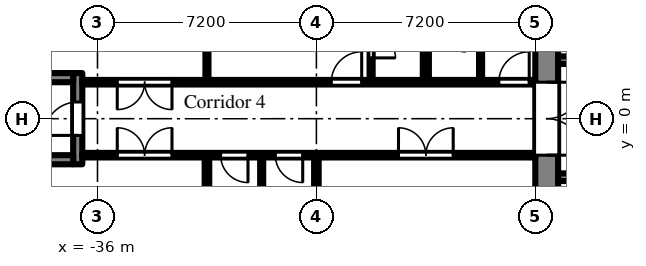
"""IFC4 building model, lengths in metres.
Left out: names, types, materials, properties, quantities, classifications, styles, units other than length and angle.
Written with IfcOpenShell. Run it as: python <this file> out.ifc"""

import sys

from ifc_helpers import new_model, si_unit, direction, frame, frame_2d, origin, place, context, subcontext, project, spatial, rectangle, extrude, element, fill, save


model = new_model("IFC4")
c1 = context("Model", 3, precision=1e-05, world=origin(), true_north=direction((0.0, 1.0)))
c2 = subcontext(c1, "Body", "Model", "MODEL_VIEW")
j1 = project(units=[si_unit("LENGTHUNIT", "METRE"), si_unit("PLANEANGLEUNIT", "RADIAN")], contexts=[c1])
p1 = place(None, origin())
s1 = spatial("IfcSite", under=j1, at=p1, CompositionType="ELEMENT")
p2 = place(p1, origin())
s2 = spatial("IfcBuilding", under=s1, at=p2, CompositionType="ELEMENT")
p3 = place(p2, frame((0.0, 0.0, 53.7)))
s3 = spatial("IfcBuildingStorey", under=s2, at=p3, CompositionType="ELEMENT", Elevation=53.7)
p4 = place(p3, frame((-21.225, -7.2, 0.0), z_axis=(0.0, 0.0, 1.0), x_axis=(0.0, 1.0, 0.0)))
e1 = element("IfcWall", 1, at=p4, inside=s3, PredefinedType="SHEAR", context=c2, shape_type="SweptSolid", body=[
    extrude(rectangle(XDim=14.4, YDim=0.75, at=frame_2d((7.2, 0.0))), origin(), (0.0, 0.0, 1.0), 2.575),
])
p5 = place(p4, frame((6.0, 0.0, 0.0)))
e2 = element("IfcOpeningElement", 2, at=p5, cuts=e1, PredefinedType="OPENING", context=c2, shape_type="SweptSolid", body=[
    extrude(rectangle(XDim=2.4, YDim=2.2, at=frame_2d((1.2, 1.1))), frame((0.0, 0.385, 0.0), z_axis=(0.0, -1.0, 0.0), x_axis=(1.0, 0.0, 0.0)), (0.0, 0.0, 1.0), 0.77),
])
p6 = place(p3, frame((-7.9, 1.925, 0.0), z_axis=(0.0, 0.0, 1.0), x_axis=(-1.0, 0.0, 0.0)))
e3 = element("IfcWall", 3, at=p6, inside=s3, PredefinedType="SHEAR", context=c2, shape_type="SweptSolid", body=[
    extrude(rectangle(XDim=12.95, YDim=0.25, at=frame_2d((6.475, 0.0))), origin(), (0.0, 0.0, 1.0), 2.575),
])
p7 = place(p6, frame((0.525, 0.0, 0.0)))
e4 = element("IfcOpeningElement", 4, at=p7, cuts=e3, PredefinedType="OPENING", context=c2, shape_type="SweptSolid", body=[
    extrude(rectangle(XDim=0.9, YDim=2.1, at=frame_2d((0.45, 1.05))), frame((0.0, 0.135, 0.0), z_axis=(0.0, -1.0, 0.0), x_axis=(1.0, 0.0, 0.0)), (0.0, 0.0, 1.0), 0.27),
])
p8 = place(p6, frame((2.625, 0.0, 0.0)))
e5 = element("IfcOpeningElement", 5, at=p8, cuts=e3, PredefinedType="OPENING", context=c2, shape_type="SweptSolid", body=[
    extrude(rectangle(XDim=1.1, YDim=2.1, at=frame_2d((0.55, 1.05))), frame((0.0, 0.135, 0.0), z_axis=(0.0, -1.0, 0.0), x_axis=(1.0, 0.0, 0.0)), (0.0, 0.0, 1.0), 0.27),
])
p9 = place(p6, frame((6.025, 0.0, 0.0)))
e6 = element("IfcOpeningElement", 6, at=p9, cuts=e3, PredefinedType="OPENING", context=c2, shape_type="SweptSolid", body=[
    extrude(rectangle(XDim=0.9, YDim=2.1, at=frame_2d((0.45, 1.05))), frame((0.0, 0.135, 0.0), z_axis=(0.0, -1.0, 0.0), x_axis=(1.0, 0.0, 0.0)), (0.0, 0.0, 1.0), 0.27),
])
p10 = place(p6, frame((9.325, 0.0, 0.0)))
e7 = element("IfcOpeningElement", 7, at=p10, cuts=e3, PredefinedType="OPENING", context=c2, shape_type="SweptSolid", body=[
    extrude(rectangle(XDim=0.9, YDim=2.1, at=frame_2d((0.45, 1.05))), frame((0.0, 0.135, 0.0), z_axis=(0.0, -1.0, 0.0), x_axis=(1.0, 0.0, 0.0)), (0.0, 0.0, 1.0), 0.27),
])
p11 = place(p3, frame((-7.9, -1.925, 0.0), z_axis=(0.0, 0.0, 1.0), x_axis=(-1.0, 0.0, 0.0)))
e8 = element("IfcWall", 8, at=p11, inside=s3, PredefinedType="SHEAR", context=c2, shape_type="SweptSolid", body=[
    extrude(rectangle(XDim=12.95, YDim=0.25, at=frame_2d((6.475, 0.0))), origin(), (0.0, 0.0, 1.0), 2.575),
])
p12 = place(p11, frame((4.825, 0.0, 0.0)))
e9 = element("IfcOpeningElement", 9, at=p12, cuts=e8, PredefinedType="OPENING", context=c2, shape_type="SweptSolid", body=[
    extrude(rectangle(XDim=1.1, YDim=2.1, at=frame_2d((0.55, 1.05))), frame((0.0, 0.135, 0.0), z_axis=(0.0, -1.0, 0.0), x_axis=(1.0, 0.0, 0.0)), (0.0, 0.0, 1.0), 0.27),
])
p13 = place(p11, frame((7.025, 0.0, 0.0)))
e10 = element("IfcOpeningElement", 10, at=p13, cuts=e8, PredefinedType="OPENING", context=c2, shape_type="SweptSolid", body=[
    extrude(rectangle(XDim=1.1, YDim=2.1, at=frame_2d((0.55, 1.05))), frame((0.0, 0.135, 0.0), z_axis=(0.0, -1.0, 0.0), x_axis=(1.0, 0.0, 0.0)), (0.0, 0.0, 1.0), 0.27),
])
p14 = place(p11, frame((9.225, 0.0, 0.0)))
e11 = element("IfcOpeningElement", 11, at=p14, cuts=e8, PredefinedType="OPENING", context=c2, shape_type="SweptSolid", body=[
    extrude(rectangle(XDim=1.1, YDim=2.1, at=frame_2d((0.55, 1.05))), frame((0.0, 0.135, 0.0), z_axis=(0.0, -1.0, 0.0), x_axis=(1.0, 0.0, 0.0)), (0.0, 0.0, 1.0), 0.27),
])
p15 = place(p11, frame((0.525, 0.0, 0.0)))
e12 = element("IfcOpeningElement", 12, at=p15, cuts=e8, PredefinedType="OPENING", context=c2, shape_type="SweptSolid", body=[
    extrude(rectangle(XDim=0.9, YDim=2.1, at=frame_2d((0.45, 1.05))), frame((0.0, 0.135, 0.0), z_axis=(0.0, -1.0, 0.0), x_axis=(1.0, 0.0, 0.0)), (0.0, 0.0, 1.0), 0.27),
])
p16 = place(p11, frame((2.625, 0.0, 0.0)))
e13 = element("IfcOpeningElement", 13, at=p16, cuts=e8, PredefinedType="OPENING", context=c2, shape_type="SweptSolid", body=[
    extrude(rectangle(XDim=1.1, YDim=2.1, at=frame_2d((0.55, 1.05))), frame((0.0, 0.135, 0.0), z_axis=(0.0, -1.0, 0.0), x_axis=(1.0, 0.0, 0.0)), (0.0, 0.0, 1.0), 0.27),
])
p17 = place(p3, frame((-36.65, -1.5, 0.0), z_axis=(0.0, 0.0, 1.0), x_axis=(0.0, 1.0, 0.0)))
e14 = element("IfcWall", 14, at=p17, inside=s3, PredefinedType="SHEAR", context=c2, shape_type="SweptSolid", body=[
    extrude(rectangle(XDim=3.0, YDim=0.3, at=frame_2d((1.5, 0.0))), origin(), (0.0, 0.0, 1.0), 2.575),
])
p18 = place(p17, frame((0.95, 0.0, 0.0)))
e15 = element("IfcOpeningElement", 15, at=p18, cuts=e14, PredefinedType="OPENING", context=c2, shape_type="SweptSolid", body=[
    extrude(rectangle(XDim=1.1, YDim=2.1, at=frame_2d((0.55, 1.05))), frame((0.0, 0.16, 0.0), z_axis=(0.0, -1.0, 0.0), x_axis=(1.0, 0.0, 0.0)), (0.0, 0.0, 1.0), 0.32),
])
for number, where, z_axis, x_axis in (
    (16, (-36.8, -1.35, 0.0), (0.0, 0.0, 1.0), (-1.0, 0.0, 0.0)),
    (17, (-36.8, 1.35, 0.0), (0.0, 0.0, 1.0), (-1.0, 0.0, 0.0)),
):
    element("IfcWall", number, at=place(p3, frame(where, z_axis=z_axis, x_axis=x_axis)), inside=s3, PredefinedType="SHEAR", context=c2, shape_type="SweptSolid", body=[
        extrude(rectangle(XDim=5.8, YDim=0.3, at=frame_2d((2.9, 0.0))), origin(), (0.0, 0.0, 1.0), 2.575),
    ])
p19 = place(p3, frame((-36.5, -1.2, 0.0), z_axis=(0.0, 0.0, 1.0), x_axis=(1.0, 0.0, 0.0)))
e18 = element("IfcWall", 18, at=p19, inside=s3, PredefinedType="PARTITIONING", context=c2, shape_type="SweptSolid", body=[
    extrude(rectangle(XDim=14.9, YDim=0.15, at=frame_2d((7.45, 0.0))), origin(), (0.0, 0.0, 1.0), 2.575),
])
p20 = place(p19, frame((10.4, 0.0, 0.0)))
e19 = element("IfcOpeningElement", 19, at=p20, cuts=e18, PredefinedType="OPENING", context=c2, shape_type="SweptSolid", body=[
    extrude(rectangle(XDim=1.8, YDim=2.1, at=frame_2d((0.9, 1.05))), frame((0.0, 0.085, 0.0), z_axis=(0.0, -1.0, 0.0), x_axis=(1.0, 0.0, 0.0)), (0.0, 0.0, 1.0), 0.17),
])
p21 = place(p19, frame((6.35, 0.0, 0.0)))
e20 = element("IfcOpeningElement", 20, at=p21, cuts=e18, PredefinedType="OPENING", context=c2, shape_type="SweptSolid", body=[
    extrude(rectangle(XDim=0.9, YDim=2.1, at=frame_2d((0.45, 1.05))), frame((0.0, 0.085, 0.0), z_axis=(0.0, -1.0, 0.0), x_axis=(1.0, 0.0, 0.0)), (0.0, 0.0, 1.0), 0.17),
])
p22 = place(p19, frame((4.55, 0.0, 0.0)))
e21 = element("IfcOpeningElement", 21, at=p22, cuts=e18, PredefinedType="OPENING", context=c2, shape_type="SweptSolid", body=[
    extrude(rectangle(XDim=0.9, YDim=2.1, at=frame_2d((0.45, 1.05))), frame((0.0, 0.085, 0.0), z_axis=(0.0, -1.0, 0.0), x_axis=(1.0, 0.0, 0.0)), (0.0, 0.0, 1.0), 0.17),
])
p23 = place(p19, frame((1.15, 0.0, 0.0)))
e22 = element("IfcOpeningElement", 22, at=p23, cuts=e18, PredefinedType="OPENING", context=c2, shape_type="SweptSolid", body=[
    extrude(rectangle(XDim=1.8, YDim=2.1, at=frame_2d((0.9, 1.05))), frame((0.0, 0.085, 0.0), z_axis=(0.0, -1.0, 0.0), x_axis=(1.0, 0.0, 0.0)), (0.0, 0.0, 1.0), 0.17),
])
p24 = place(p3, frame((-36.5, 1.2, 0.0), z_axis=(0.0, 0.0, 1.0), x_axis=(1.0, 0.0, 0.0)))
e23 = element("IfcWall", 23, at=p24, inside=s3, PredefinedType="PARTITIONING", context=c2, shape_type="SweptSolid", body=[
    extrude(rectangle(XDim=14.9, YDim=0.15, at=frame_2d((7.45, 0.0))), origin(), (0.0, 0.0, 1.0), 2.575),
])
p25 = place(p24, frame((13.7, 0.0, 0.0)))
e24 = element("IfcOpeningElement", 24, at=p25, cuts=e23, PredefinedType="OPENING", context=c2, shape_type="SweptSolid", body=[
    extrude(rectangle(XDim=1.0, YDim=2.1, at=frame_2d((0.5, 1.05))), frame((0.0, 0.085, 0.0), z_axis=(0.0, -1.0, 0.0), x_axis=(1.0, 0.0, 0.0)), (0.0, 0.0, 1.0), 0.17),
])
p26 = place(p24, frame((8.19, 0.0, 0.0)))
e25 = element("IfcOpeningElement", 25, at=p26, cuts=e23, PredefinedType="OPENING", context=c2, shape_type="SweptSolid", body=[
    extrude(rectangle(XDim=1.0, YDim=2.1, at=frame_2d((0.5, 1.05))), frame((0.0, 0.085, 0.0), z_axis=(0.0, -1.0, 0.0), x_axis=(1.0, 0.0, 0.0)), (0.0, 0.0, 1.0), 0.17),
])
p27 = place(p24, frame((1.15, 0.0, 0.0)))
e26 = element("IfcOpeningElement", 26, at=p27, cuts=e23, PredefinedType="OPENING", context=c2, shape_type="SweptSolid", body=[
    extrude(rectangle(XDim=1.8, YDim=2.1, at=frame_2d((0.9, 1.05))), frame((0.0, 0.085, 0.0), z_axis=(0.0, -1.0, 0.0), x_axis=(1.0, 0.0, 0.0)), (0.0, 0.0, 1.0), 0.17),
])
p28 = place(p3, frame((-32.4, -6.9, 0.0), z_axis=(0.0, 0.0, 1.0), x_axis=(0.0, 1.0, 0.0)))
e27 = element("IfcWall", 27, at=p28, inside=s3, PredefinedType="PARTITIONING", context=c2, shape_type="SweptSolid", body=[
    extrude(rectangle(XDim=5.625, YDim=0.15, at=frame_2d((2.812, 0.0))), origin(), (0.0, 0.0, 1.0), 2.575),
])
for number, where, z_axis, x_axis in (
    (28, (-32.4, 1.275, 0.0), (0.0, 0.0, 1.0), (0.0, 1.0, 0.0)),
    (29, (-30.6, -6.9, 0.0), (0.0, 0.0, 1.0), (0.0, 1.0, 0.0)),
):
    element("IfcWall", number, at=place(p3, frame(where, z_axis=z_axis, x_axis=x_axis)), inside=s3, PredefinedType="PARTITIONING", context=c2, shape_type="SweptSolid", body=[
        extrude(rectangle(XDim=5.625, YDim=0.1, at=frame_2d((2.812, 0.0))), origin(), (0.0, 0.0, 1.0), 2.575),
    ])
p29 = place(p3, frame((-28.8, -6.9, 0.0), z_axis=(0.0, 0.0, 1.0), x_axis=(0.0, 1.0, 0.0)))
e30 = element("IfcWall", 30, at=p29, inside=s3, PredefinedType="PARTITIONING", context=c2, shape_type="SweptSolid", body=[
    extrude(rectangle(XDim=5.625, YDim=0.15, at=frame_2d((2.812, 0.0))), origin(), (0.0, 0.0, 1.0), 2.575),
])
p30 = place(p3, frame((-27.0, 1.275, 0.0), z_axis=(0.0, 0.0, 1.0), x_axis=(0.0, 1.0, 0.0)))
e31 = element("IfcWall", 31, at=p30, inside=s3, PredefinedType="PARTITIONING", context=c2, shape_type="SweptSolid", body=[
    extrude(rectangle(XDim=2.375, YDim=0.1, at=frame_2d((1.188, 0.0))), origin(), (0.0, 0.0, 1.0), 2.575),
])
p31 = place(p30, frame((0.725, 0.0, 0.0)))
e32 = element("IfcOpeningElement", 32, at=p31, cuts=e31, PredefinedType="OPENING", context=c2, shape_type="SweptSolid", body=[
    extrude(rectangle(XDim=0.8, YDim=2.1, at=frame_2d((0.4, 1.05))), frame((0.0, 0.06, 0.0), z_axis=(0.0, -1.0, 0.0), x_axis=(1.0, 0.0, 0.0)), (0.0, 0.0, 1.0), 0.12),
])
p32 = place(p3, frame((-25.2, 1.275, 0.0), z_axis=(0.0, 0.0, 1.0), x_axis=(0.0, 1.0, 0.0)))
e33 = element("IfcWall", 33, at=p32, inside=s3, PredefinedType="PARTITIONING", context=c2, shape_type="SweptSolid", body=[
    extrude(rectangle(XDim=5.625, YDim=0.2, at=frame_2d((2.812, 0.0))), origin(), (0.0, 0.0, 1.0), 2.575),
])
p33 = place(p3, frame((-23.4, 1.275, 0.0), z_axis=(0.0, 0.0, 1.0), x_axis=(0.0, 1.0, 0.0)))
e34 = element("IfcWall", 34, at=p33, inside=s3, PredefinedType="PARTITIONING", context=c2, shape_type="SweptSolid", body=[
    extrude(rectangle(XDim=1.675, YDim=0.1, at=frame_2d((0.837, 0.0))), origin(), (0.0, 0.0, 1.0), 2.575),
])
p34 = place(p5, frame((2.4, 0.0, 0.0), z_axis=(0.0, 0.0, 1.0), x_axis=(-1.0, 0.0, 0.0)))
e35 = element("IfcDoor", 35, at=p34, inside=s3, OperationType="DOUBLE_DOOR_DOUBLE_SWING", PredefinedType="DOOR", context=c2, shape_type="SweptSolid", body=[
    extrude(rectangle(XDim=2.4, YDim=2.2, at=frame_2d((1.2, 1.1))), frame((0.0, 0.025, 0.0), z_axis=(0.0, -1.0, 0.0), x_axis=(1.0, 0.0, 0.0)), (0.0, 0.0, 1.0), 0.05),
])
fill(e2, e35)
p35 = place(p18, origin())
e36 = element("IfcDoor", 36, at=p35, inside=s3, OperationType="SINGLE_SWING_LEFT", PredefinedType="DOOR", context=c2, shape_type="SweptSolid", body=[
    extrude(rectangle(XDim=1.1, YDim=2.1, at=frame_2d((0.55, 1.05))), frame((0.0, 0.025, 0.0), z_axis=(0.0, -1.0, 0.0), x_axis=(1.0, 0.0, 0.0)), (0.0, 0.0, 1.0), 0.05),
])
fill(e15, e36)
p36 = place(p20, origin())
e37 = element("IfcDoor", 37, at=p36, inside=s3, OperationType="DOUBLE_DOOR_DOUBLE_SWING", PredefinedType="DOOR", context=c2, shape_type="SweptSolid", body=[
    extrude(rectangle(XDim=1.8, YDim=2.1, at=frame_2d((0.9, 1.05))), frame((0.0, 0.025, 0.0), z_axis=(0.0, -1.0, 0.0), x_axis=(1.0, 0.0, 0.0)), (0.0, 0.0, 1.0), 0.05),
])
fill(e19, e37)
p37 = place(p21, frame((0.9, 0.0, 0.0), z_axis=(0.0, 0.0, 1.0), x_axis=(-1.0, 0.0, 0.0)))
e38 = element("IfcDoor", 38, at=p37, inside=s3, OperationType="SINGLE_SWING_LEFT", PredefinedType="DOOR", context=c2, shape_type="SweptSolid", body=[
    extrude(rectangle(XDim=0.9, YDim=2.1, at=frame_2d((0.45, 1.05))), frame((0.0, 0.025, 0.0), z_axis=(0.0, -1.0, 0.0), x_axis=(1.0, 0.0, 0.0)), (0.0, 0.0, 1.0), 0.05),
])
fill(e20, e38)
p38 = place(p22, frame((0.9, 0.0, 0.0), z_axis=(0.0, 0.0, 1.0), x_axis=(-1.0, 0.0, 0.0)))
e39 = element("IfcDoor", 39, at=p38, inside=s3, OperationType="SINGLE_SWING_LEFT", PredefinedType="DOOR", context=c2, shape_type="SweptSolid", body=[
    extrude(rectangle(XDim=0.9, YDim=2.1, at=frame_2d((0.45, 1.05))), frame((0.0, 0.025, 0.0), z_axis=(0.0, -1.0, 0.0), x_axis=(1.0, 0.0, 0.0)), (0.0, 0.0, 1.0), 0.05),
])
fill(e21, e39)
p39 = place(p23, origin())
e40 = element("IfcDoor", 40, at=p39, inside=s3, OperationType="DOUBLE_DOOR_DOUBLE_SWING", PredefinedType="DOOR", context=c2, shape_type="SweptSolid", body=[
    extrude(rectangle(XDim=1.8, YDim=2.1, at=frame_2d((0.9, 1.05))), frame((0.0, 0.025, 0.0), z_axis=(0.0, -1.0, 0.0), x_axis=(1.0, 0.0, 0.0)), (0.0, 0.0, 1.0), 0.05),
])
fill(e22, e40)
p40 = place(p25, origin())
e41 = element("IfcDoor", 41, at=p40, inside=s3, OperationType="SINGLE_SWING_RIGHT", PredefinedType="DOOR", context=c2, shape_type="SweptSolid", body=[
    extrude(rectangle(XDim=1.0, YDim=2.1, at=frame_2d((0.5, 1.05))), frame((0.0, 0.025, 0.0), z_axis=(0.0, -1.0, 0.0), x_axis=(1.0, 0.0, 0.0)), (0.0, 0.0, 1.0), 0.05),
])
fill(e24, e41)
p41 = place(p31, frame((0.8, 0.0, 0.0), z_axis=(0.0, 0.0, 1.0), x_axis=(-1.0, 0.0, 0.0)))
e42 = element("IfcDoor", 42, at=p41, inside=s3, OperationType="SINGLE_SWING_RIGHT", PredefinedType="DOOR", context=c2, shape_type="SweptSolid", body=[
    extrude(rectangle(XDim=0.8, YDim=2.1, at=frame_2d((0.4, 1.05))), frame((0.0, 0.025, 0.0), z_axis=(0.0, -1.0, 0.0), x_axis=(1.0, 0.0, 0.0)), (0.0, 0.0, 1.0), 0.05),
])
fill(e32, e42)
p42 = place(p26, origin())
e43 = element("IfcDoor", 43, at=p42, inside=s3, OperationType="SINGLE_SWING_RIGHT", PredefinedType="DOOR", context=c2, shape_type="SweptSolid", body=[
    extrude(rectangle(XDim=1.0, YDim=2.1, at=frame_2d((0.5, 1.05))), frame((0.0, 0.025, 0.0), z_axis=(0.0, -1.0, 0.0), x_axis=(1.0, 0.0, 0.0)), (0.0, 0.0, 1.0), 0.05),
])
fill(e25, e43)
p43 = place(p27, frame((1.8, 0.0, 0.0), z_axis=(0.0, 0.0, 1.0), x_axis=(-1.0, 0.0, 0.0)))
e44 = element("IfcDoor", 44, at=p43, inside=s3, OperationType="DOUBLE_DOOR_DOUBLE_SWING", PredefinedType="DOOR", context=c2, shape_type="SweptSolid", body=[
    extrude(rectangle(XDim=1.8, YDim=2.1, at=frame_2d((0.9, 1.05))), frame((0.0, 0.025, 0.0), z_axis=(0.0, -1.0, 0.0), x_axis=(1.0, 0.0, 0.0)), (0.0, 0.0, 1.0), 0.05),
])
fill(e26, e44)
save(model, sys.argv[1])
